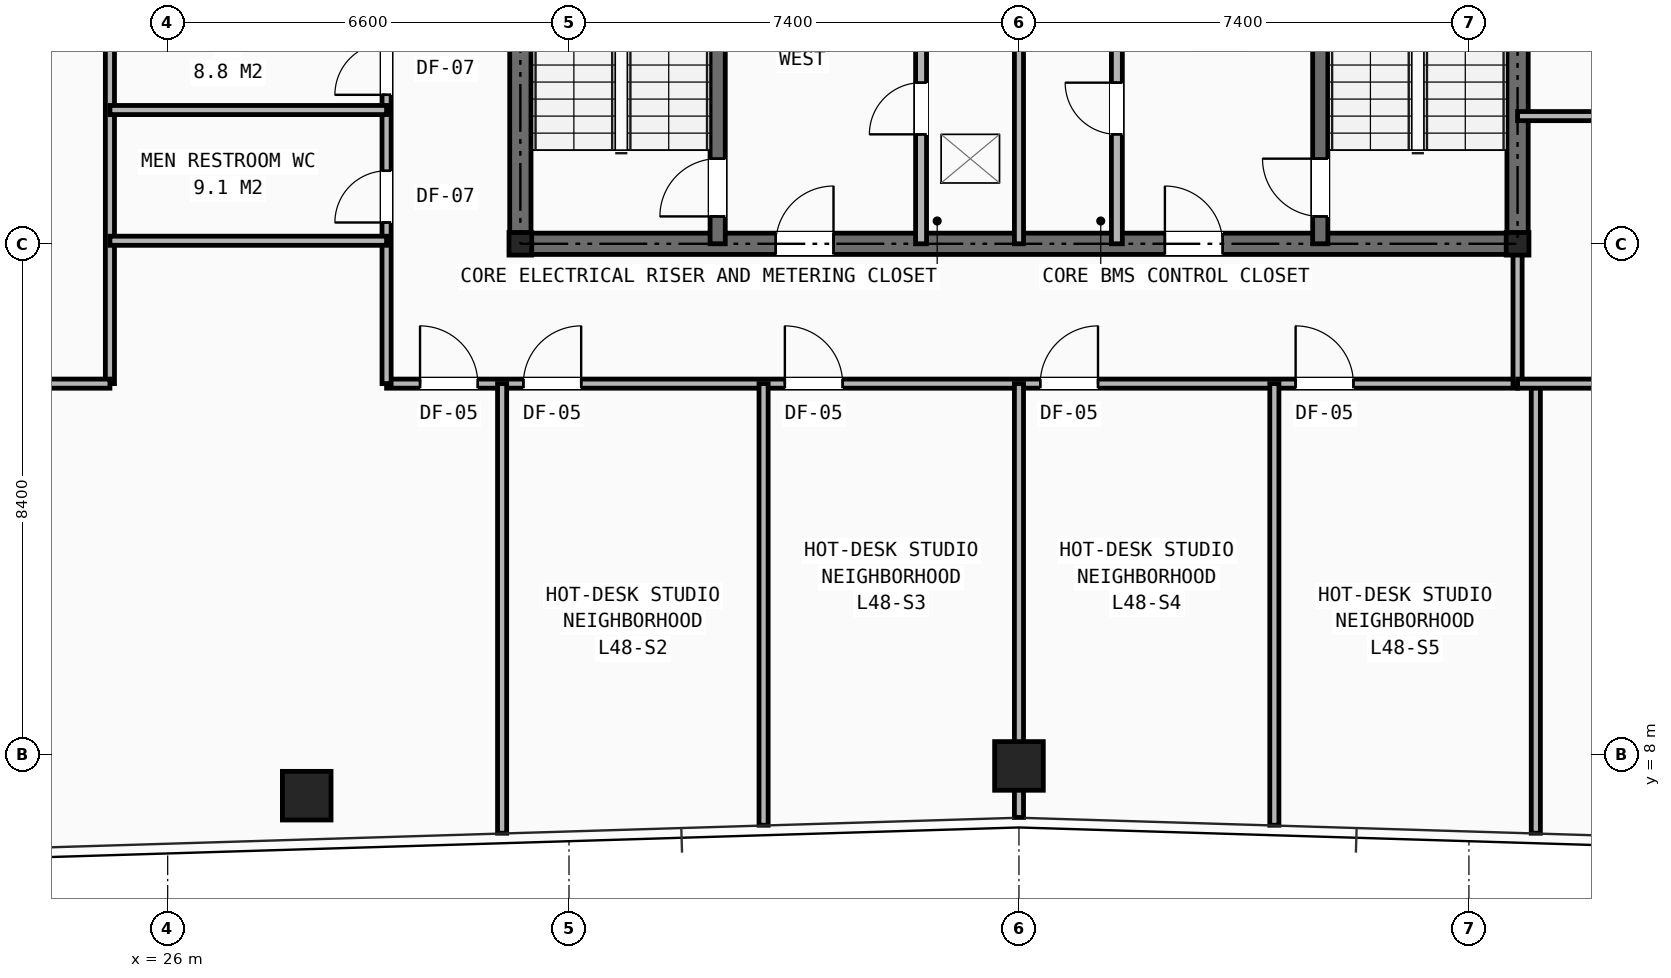
"""IFC4 building model, lengths in metres.
Left out: names, types, materials, properties, quantities, classifications, styles, units other than length and angle.
Written with IfcOpenShell. Run it as: python <this file> out.ifc"""

import sys

from ifc_helpers import new_model, si_unit, direction, frame, frame_2d, origin, origin_2d, place, context, subcontext, project, spatial, rectangle, hollow_rectangle, i_section, extrude, element, fill, save


model = new_model("IFC4")
c1 = context("Model", 3, precision=1e-05, world=origin(), true_north=direction((0.0, 1.0)))
c2 = subcontext(c1, "Body", "Model", "MODEL_VIEW")
j1 = project(units=[si_unit("LENGTHUNIT", "METRE"), si_unit("PLANEANGLEUNIT", "RADIAN")], contexts=[c1])
p1 = place(None, origin())
s1 = spatial("IfcSite", under=j1, at=p1, CompositionType="ELEMENT")
p2 = place(p1, origin())
s2 = spatial("IfcBuilding", under=s1, at=p2, CompositionType="ELEMENT")
p3 = place(p2, frame((0.0, 0.0, 168.9)))
s3 = spatial("IfcBuildingStorey", under=s2, at=p3, CompositionType="ELEMENT", Elevation=168.9)
for number, where, z_axis, x_axis in (
    (1, (31.8, 16.4, 0.0), (0.0, 0.0, 1.0), (1.0, 0.0, 0.0)),
    (2, (48.2, 16.4, 0.0), (0.0, 0.0, 1.0), (1.0, 0.0, 0.0)),
):
    element("IfcColumn", number, at=place(p3, frame(where, z_axis=z_axis, x_axis=x_axis)), inside=s3, PredefinedType="COLUMN", context=c2, shape_type="SweptSolid", body=[
        extrude(i_section(OverallWidth=0.374, OverallDepth=0.372, WebThickness=0.016, FlangeThickness=0.026, at=origin_2d()), origin(), (0.0, 0.0, 1.0), 3.45),
    ])
for number, where, z_axis, x_axis in (
    (3, (28.287, 7.323, 0.0), (0.0, 0.0, 1.0), (1.0, 0.0, 0.0)),
    (4, (40.0, 7.812, 0.0), (0.0, 0.0, 1.0), (1.0, 0.0, 0.0)),
):
    element("IfcColumn", number, at=place(p3, frame(where, z_axis=z_axis, x_axis=x_axis)), inside=s3, PredefinedType="COLUMN", context=c2, shape_type="SweptSolid", body=[
        extrude(hollow_rectangle(XDim=0.8, YDim=0.8, WallThickness=0.055, at=origin_2d()), origin(), (0.0, 0.0, 1.0), 3.45),
    ])
p4 = place(p3, frame((31.8, 16.4, 0.0), z_axis=(0.0, 0.0, 1.0), x_axis=(1.0, 0.0, 0.0)))
e5 = element("IfcWall", 5, at=p4, inside=s3, PredefinedType="SHEAR", context=c2, shape_type="SweptSolid", body=[
    extrude(rectangle(XDim=16.4, YDim=0.35, at=frame_2d((8.2, 0.0))), origin(), (0.0, 0.0, 1.0), 3.21),
])
p5 = place(p4, frame((4.2, 0.0, 0.0)))
e6 = element("IfcOpeningElement", 6, at=p5, cuts=e5, PredefinedType="OPENING", context=c2, shape_type="SweptSolid", body=[
    extrude(rectangle(XDim=0.95, YDim=2.1, at=frame_2d((0.475, 1.05))), frame((0.0, 0.185, 0.0), z_axis=(0.0, -1.0, 0.0), x_axis=(1.0, 0.0, 0.0)), (0.0, 0.0, 1.0), 0.37),
])
p6 = place(p4, frame((10.6, 0.0, 0.0)))
e7 = element("IfcOpeningElement", 7, at=p6, cuts=e5, PredefinedType="OPENING", context=c2, shape_type="SweptSolid", body=[
    extrude(rectangle(XDim=0.95, YDim=2.1, at=frame_2d((0.475, 1.05))), frame((0.0, 0.185, 0.0), z_axis=(0.0, -1.0, 0.0), x_axis=(1.0, 0.0, 0.0)), (0.0, 0.0, 1.0), 0.37),
])
p7 = place(p3, frame((31.8, 16.4, 0.0), z_axis=(0.0, 0.0, 1.0), x_axis=(0.0, 1.0, 0.0)))
e8 = element("IfcWall", 8, at=p7, inside=s3, PredefinedType="SHEAR", context=c2, shape_type="SweptSolid", body=[
    extrude(rectangle(XDim=14.8, YDim=0.35, at=frame_2d((7.4, 0.0))), origin(), (0.0, 0.0, 1.0), 3.21),
])
p8 = place(p7, frame((11.0, 0.0, 0.0)))
e9 = element("IfcOpeningElement", 9, at=p8, cuts=e8, PredefinedType="OPENING", context=c2, shape_type="SweptSolid", body=[
    extrude(rectangle(XDim=1.1, YDim=2.15, at=frame_2d((0.55, 1.075))), frame((0.0, 0.185, 0.0), z_axis=(0.0, -1.0, 0.0), x_axis=(1.0, 0.0, 0.0)), (0.0, 0.0, 1.0), 0.37),
])
p9 = place(p3, frame((48.2, 16.4, 0.0), z_axis=(0.0, 0.0, 1.0), x_axis=(0.0, 1.0, 0.0)))
e10 = element("IfcWall", 10, at=p9, inside=s3, PredefinedType="SHEAR", context=c2, shape_type="SweptSolid", body=[
    extrude(rectangle(XDim=14.8, YDim=0.35, at=frame_2d((7.4, 0.0))), origin(), (0.0, 0.0, 1.0), 3.21),
])
p10 = place(p9, frame((11.0, 0.0, 0.0)))
e11 = element("IfcOpeningElement", 11, at=p10, cuts=e10, PredefinedType="OPENING", context=c2, shape_type="SweptSolid", body=[
    extrude(rectangle(XDim=1.1, YDim=2.15, at=frame_2d((0.55, 1.075))), frame((0.0, 0.185, 0.0), z_axis=(0.0, -1.0, 0.0), x_axis=(1.0, 0.0, 0.0)), (0.0, 0.0, 1.0), 0.37),
])
p11 = place(p3, frame((35.045, 16.4, 0.0), z_axis=(0.0, 0.0, 1.0), x_axis=(0.0, 1.0, 0.0)))
e12 = element("IfcWall", 12, at=p11, inside=s3, PredefinedType="SHEAR", context=c2, shape_type="SweptSolid", body=[
    extrude(rectangle(XDim=8.4, YDim=0.25, at=frame_2d((4.2, 0.0))), origin(), (0.0, 0.0, 1.0), 3.21),
])
p12 = place(p11, frame((0.45, 0.0, 0.0)))
e13 = element("IfcOpeningElement", 13, at=p12, cuts=e12, PredefinedType="OPENING", context=c2, shape_type="SweptSolid", body=[
    extrude(rectangle(XDim=0.95, YDim=2.1, at=frame_2d((0.475, 1.05))), frame((0.0, 0.135, 0.0), z_axis=(0.0, -1.0, 0.0), x_axis=(1.0, 0.0, 0.0)), (0.0, 0.0, 1.0), 0.27),
])
p13 = place(p3, frame((44.955, 16.4, 0.0), z_axis=(0.0, 0.0, 1.0), x_axis=(0.0, 1.0, 0.0)))
e14 = element("IfcWall", 14, at=p13, inside=s3, PredefinedType="SHEAR", context=c2, shape_type="SweptSolid", body=[
    extrude(rectangle(XDim=8.4, YDim=0.25, at=frame_2d((4.2, 0.0))), origin(), (0.0, 0.0, 1.0), 3.21),
])
p14 = place(p13, frame((0.45, 0.0, 0.0)))
e15 = element("IfcOpeningElement", 15, at=p14, cuts=e14, PredefinedType="OPENING", context=c2, shape_type="SweptSolid", body=[
    extrude(rectangle(XDim=0.95, YDim=2.1, at=frame_2d((0.475, 1.05))), frame((0.0, 0.135, 0.0), z_axis=(0.0, -1.0, 0.0), x_axis=(1.0, 0.0, 0.0)), (0.0, 0.0, 1.0), 0.27),
])
p15 = place(p3, frame((38.39, 16.4, 0.0), z_axis=(0.0, 0.0, 1.0), x_axis=(0.0, 1.0, 0.0)))
e16 = element("IfcWall", 16, at=p15, inside=s3, PredefinedType="PARTITIONING", context=c2, shape_type="SweptSolid", body=[
    extrude(rectangle(XDim=8.4, YDim=0.18, at=frame_2d((4.2, 0.0))), origin(), (0.0, 0.0, 1.0), 2.665),
])
p16 = place(p15, frame((1.8, 0.0, 0.0)))
e17 = element("IfcOpeningElement", 17, at=p16, cuts=e16, PredefinedType="OPENING", context=c2, shape_type="SweptSolid", body=[
    extrude(rectangle(XDim=0.85, YDim=2.05, at=frame_2d((0.425, 1.025))), frame((0.0, 0.1, 0.0), z_axis=(0.0, -1.0, 0.0), x_axis=(1.0, 0.0, 0.0)), (0.0, 0.0, 1.0), 0.2),
])
p17 = place(p15, frame((4.35, 0.0, 0.0)))
e18 = element("IfcOpeningElement", 18, at=p17, cuts=e16, PredefinedType="OPENING", context=c2, shape_type="SweptSolid", body=[
    extrude(rectangle(XDim=0.95, YDim=2.1, at=frame_2d((0.475, 1.05))), frame((0.0, 0.1, 0.0), z_axis=(0.0, -1.0, 0.0), x_axis=(1.0, 0.0, 0.0)), (0.0, 0.0, 1.0), 0.2),
])
p18 = place(p3, frame((41.61, 16.4, 0.0), z_axis=(0.0, 0.0, 1.0), x_axis=(0.0, 1.0, 0.0)))
e19 = element("IfcWall", 19, at=p18, inside=s3, PredefinedType="PARTITIONING", context=c2, shape_type="SweptSolid", body=[
    extrude(rectangle(XDim=8.4, YDim=0.18, at=frame_2d((4.2, 0.0))), origin(), (0.0, 0.0, 1.0), 2.665),
])
p19 = place(p18, frame((1.8, 0.0, 0.0)))
e20 = element("IfcOpeningElement", 20, at=p19, cuts=e19, PredefinedType="OPENING", context=c2, shape_type="SweptSolid", body=[
    extrude(rectangle(XDim=0.85, YDim=2.05, at=frame_2d((0.425, 1.025))), frame((0.0, 0.1, 0.0), z_axis=(0.0, -1.0, 0.0), x_axis=(1.0, 0.0, 0.0)), (0.0, 0.0, 1.0), 0.2),
])
p20 = place(p3, frame((40.0, 16.4, 0.0), z_axis=(0.0, 0.0, 1.0), x_axis=(0.0, 1.0, 0.0)))
e21 = element("IfcWall", 21, at=p20, inside=s3, PredefinedType="PARTITIONING", context=c2, shape_type="SweptSolid", body=[
    extrude(rectangle(XDim=3.9, YDim=0.15, at=frame_2d((1.95, 0.0))), origin(), (0.0, 0.0, 1.0), 2.665),
])
p21 = place(p3, frame((29.6, 14.1, 0.0), z_axis=(0.0, 0.0, 1.0), x_axis=(1.0, 0.0, 0.0)))
e22 = element("IfcWall", 22, at=p21, inside=s3, PredefinedType="PARTITIONING", context=c2, shape_type="SweptSolid", body=[
    extrude(rectangle(XDim=18.6, YDim=0.15, at=frame_2d((9.3, 0.0))), origin(), (0.0, 0.0, 1.0), 2.225),
])
p22 = place(p21, frame((0.55, 0.0, 0.0)))
e23 = element("IfcOpeningElement", 23, at=p22, cuts=e22, PredefinedType="OPENING", context=c2, shape_type="SweptSolid", body=[
    extrude(rectangle(XDim=0.95, YDim=2.1, at=frame_2d((0.475, 1.05))), frame((0.0, 0.085, 0.0), z_axis=(0.0, -1.0, 0.0), x_axis=(1.0, 0.0, 0.0)), (0.0, 0.0, 1.0), 0.17),
])
p23 = place(p21, frame((2.25, 0.0, 0.0)))
e24 = element("IfcOpeningElement", 24, at=p23, cuts=e22, PredefinedType="OPENING", context=c2, shape_type="SweptSolid", body=[
    extrude(rectangle(XDim=0.95, YDim=2.1, at=frame_2d((0.475, 1.05))), frame((0.0, 0.085, 0.0), z_axis=(0.0, -1.0, 0.0), x_axis=(1.0, 0.0, 0.0)), (0.0, 0.0, 1.0), 0.17),
])
p24 = place(p21, frame((6.55, 0.0, 0.0)))
e25 = element("IfcOpeningElement", 25, at=p24, cuts=e22, PredefinedType="OPENING", context=c2, shape_type="SweptSolid", body=[
    extrude(rectangle(XDim=0.95, YDim=2.1, at=frame_2d((0.475, 1.05))), frame((0.0, 0.085, 0.0), z_axis=(0.0, -1.0, 0.0), x_axis=(1.0, 0.0, 0.0)), (0.0, 0.0, 1.0), 0.17),
])
p25 = place(p21, frame((10.75, 0.0, 0.0)))
e26 = element("IfcOpeningElement", 26, at=p25, cuts=e22, PredefinedType="OPENING", context=c2, shape_type="SweptSolid", body=[
    extrude(rectangle(XDim=0.95, YDim=2.1, at=frame_2d((0.475, 1.05))), frame((0.0, 0.085, 0.0), z_axis=(0.0, -1.0, 0.0), x_axis=(1.0, 0.0, 0.0)), (0.0, 0.0, 1.0), 0.17),
])
p26 = place(p21, frame((14.95, 0.0, 0.0)))
e27 = element("IfcOpeningElement", 27, at=p26, cuts=e22, PredefinedType="OPENING", context=c2, shape_type="SweptSolid", body=[
    extrude(rectangle(XDim=0.95, YDim=2.1, at=frame_2d((0.475, 1.05))), frame((0.0, 0.085, 0.0), z_axis=(0.0, -1.0, 0.0), x_axis=(1.0, 0.0, 0.0)), (0.0, 0.0, 1.0), 0.17),
])
p27 = place(p3, frame((48.2, 14.1, 0.0), z_axis=(0.0, 0.0, 1.0), x_axis=(0.0, 1.0, 0.0)))
e28 = element("IfcWall", 28, at=p27, inside=s3, PredefinedType="PARTITIONING", context=c2, shape_type="SweptSolid", body=[
    extrude(rectangle(XDim=2.3, YDim=0.15, at=frame_2d((1.15, 0.0))), origin(), (0.0, 0.0, 1.0), 2.665),
])
p28 = place(p3, frame((29.6, 14.1, 0.0), z_axis=(0.0, 0.0, 1.0), x_axis=(0.0, 1.0, 0.0)))
e29 = element("IfcWall", 29, at=p28, inside=s3, PredefinedType="PARTITIONING", context=c2, shape_type="SweptSolid", body=[
    extrude(rectangle(XDim=8.7, YDim=0.15, at=frame_2d((4.35, 0.0))), origin(), (0.0, 0.0, 1.0), 3.21),
])
p29 = place(p28, frame((2.65, 0.0, 0.0)))
e30 = element("IfcOpeningElement", 30, at=p29, cuts=e29, PredefinedType="OPENING", context=c2, shape_type="SweptSolid", body=[
    extrude(rectangle(XDim=0.85, YDim=2.05, at=frame_2d((0.425, 1.025))), frame((0.0, 0.085, 0.0), z_axis=(0.0, -1.0, 0.0), x_axis=(1.0, 0.0, 0.0)), (0.0, 0.0, 1.0), 0.17),
])
p30 = place(p28, frame((4.75, 0.0, 0.0)))
e31 = element("IfcOpeningElement", 31, at=p30, cuts=e29, PredefinedType="OPENING", context=c2, shape_type="SweptSolid", body=[
    extrude(rectangle(XDim=0.85, YDim=2.05, at=frame_2d((0.425, 1.025))), frame((0.0, 0.085, 0.0), z_axis=(0.0, -1.0, 0.0), x_axis=(1.0, 0.0, 0.0)), (0.0, 0.0, 1.0), 0.17),
])
p31 = place(p28, frame((6.85, 0.0, 0.0)))
e32 = element("IfcOpeningElement", 32, at=p31, cuts=e29, PredefinedType="OPENING", context=c2, shape_type="SweptSolid", body=[
    extrude(rectangle(XDim=0.85, YDim=2.05, at=frame_2d((0.425, 1.025))), frame((0.0, 0.085, 0.0), z_axis=(0.0, -1.0, 0.0), x_axis=(1.0, 0.0, 0.0)), (0.0, 0.0, 1.0), 0.17),
])
p32 = place(p3, frame((25.05, 14.1, 0.0), z_axis=(0.0, 0.0, 1.0), x_axis=(0.0, 1.0, 0.0)))
e33 = element("IfcWall", 33, at=p32, inside=s3, PredefinedType="PARTITIONING", context=c2, shape_type="SweptSolid", body=[
    extrude(rectangle(XDim=8.7, YDim=0.15, at=frame_2d((4.35, 0.0))), origin(), (0.0, 0.0, 1.0), 3.21),
])
for number, where, z_axis, x_axis in (
    (34, (25.05, 16.45, 0.0), (0.0, 0.0, 1.0), (1.0, 0.0, 0.0)),
    (35, (25.05, 18.6, 0.0), (0.0, 0.0, 1.0), (1.0, 0.0, 0.0)),
):
    element("IfcWall", number, at=place(p3, frame(where, z_axis=z_axis, x_axis=x_axis)), inside=s3, PredefinedType="PARTITIONING", context=c2, shape_type="SweptSolid", body=[
        extrude(rectangle(XDim=4.55, YDim=0.15, at=frame_2d((2.275, 0.0))), origin(), (0.0, 0.0, 1.0), 3.21),
    ])
p33 = place(p3, frame((31.5, 6.706, 0.0), z_axis=(0.0, 0.0, 1.0), x_axis=(0.0, 1.0, 0.0)))
e36 = element("IfcWall", 36, at=p33, inside=s3, PredefinedType="PARTITIONING", context=c2, shape_type="SweptSolid", body=[
    extrude(rectangle(XDim=7.394, YDim=0.15, at=frame_2d((3.697, 0.0))), origin(), (0.0, 0.0, 1.0), 2.589),
])
p34 = place(p3, frame((35.8, 6.837, 0.0), z_axis=(0.0, 0.0, 1.0), x_axis=(0.0, 1.0, 0.0)))
e37 = element("IfcWall", 37, at=p34, inside=s3, PredefinedType="PARTITIONING", context=c2, shape_type="SweptSolid", body=[
    extrude(rectangle(XDim=7.263, YDim=0.15, at=frame_2d((3.631, 0.0))), origin(), (0.0, 0.0, 1.0), 2.225),
])
p35 = place(p3, frame((40.0, 6.965, 0.0), z_axis=(0.0, 0.0, 1.0), x_axis=(0.0, 1.0, 0.0)))
e38 = element("IfcWall", 38, at=p35, inside=s3, PredefinedType="PARTITIONING", context=c2, shape_type="SweptSolid", body=[
    extrude(rectangle(XDim=7.135, YDim=0.15, at=frame_2d((3.567, 0.0))), origin(), (0.0, 0.0, 1.0), 2.225),
])
p36 = place(p3, frame((44.2, 6.837, 0.0), z_axis=(0.0, 0.0, 1.0), x_axis=(0.0, 1.0, 0.0)))
e39 = element("IfcWall", 39, at=p36, inside=s3, PredefinedType="PARTITIONING", context=c2, shape_type="SweptSolid", body=[
    extrude(rectangle(XDim=7.263, YDim=0.15, at=frame_2d((3.631, 0.0))), origin(), (0.0, 0.0, 1.0), 2.589),
])
p37 = place(p3, frame((48.5, 6.706, 0.0), z_axis=(0.0, 0.0, 1.0), x_axis=(0.0, 1.0, 0.0)))
e40 = element("IfcWall", 40, at=p37, inside=s3, PredefinedType="PARTITIONING", context=c2, shape_type="SweptSolid", body=[
    extrude(rectangle(XDim=7.394, YDim=0.15, at=frame_2d((3.697, 0.0))), origin(), (0.0, 0.0, 1.0), 2.589),
])
p38 = place(p3, frame((13.492, 14.1, 0.0), z_axis=(0.0, 0.0, 1.0), x_axis=(1.0, 0.0, 0.0)))
e41 = element("IfcWall", 41, at=p38, inside=s3, PredefinedType="PARTITIONING", context=c2, shape_type="SweptSolid", body=[
    extrude(rectangle(XDim=11.558, YDim=0.15, at=frame_2d((5.779, 0.0))), origin(), (0.0, 0.0, 1.0), 2.589),
])
p39 = place(p3, frame((48.2, 14.1, 0.0), z_axis=(0.0, 0.0, 1.0), x_axis=(1.0, 0.0, 0.0)))
e42 = element("IfcWall", 42, at=p39, inside=s3, PredefinedType="PARTITIONING", context=c2, shape_type="SweptSolid", body=[
    extrude(rectangle(XDim=18.308, YDim=0.15, at=frame_2d((9.154, 0.0))), origin(), (0.0, 0.0, 1.0), 2.589),
])
p40 = place(p3, frame((48.2, 18.5, 0.0), z_axis=(0.0, 0.0, 1.0), x_axis=(1.0, 0.0, 0.0)))
e43 = element("IfcWall", 43, at=p40, inside=s3, PredefinedType="PARTITIONING", context=c2, shape_type="SweptSolid", body=[
    extrude(rectangle(XDim=15.585, YDim=0.15, at=frame_2d((7.792, 0.0))), origin(), (0.0, 0.0, 1.0), 2.589),
])
p41 = place(p40, frame((1.4, 0.0, 0.0)))
e44 = element("IfcOpeningElement", 44, at=p41, cuts=e43, PredefinedType="OPENING", context=c2, shape_type="SweptSolid", body=[
    extrude(rectangle(XDim=0.95, YDim=2.1, at=frame_2d((0.475, 1.05))), frame((0.0, 0.085, 0.0), z_axis=(0.0, -1.0, 0.0), x_axis=(1.0, 0.0, 0.0)), (0.0, 0.0, 1.0), 0.17),
])
p42 = place(p16, origin())
e45 = element("IfcDoor", 45, at=p42, inside=s3, OperationType="SINGLE_SWING_LEFT", PredefinedType="DOOR", context=c2, shape_type="SweptSolid", body=[
    extrude(rectangle(XDim=0.85, YDim=2.05, at=frame_2d((0.425, 1.025))), frame((0.0, 0.025, 0.0), z_axis=(0.0, -1.0, 0.0), x_axis=(1.0, 0.0, 0.0)), (0.0, 0.0, 1.0), 0.05),
])
fill(e17, e45)
p43 = place(p19, origin())
e46 = element("IfcDoor", 46, at=p43, inside=s3, OperationType="SINGLE_SWING_RIGHT", PredefinedType="DOOR", context=c2, shape_type="SweptSolid", body=[
    extrude(rectangle(XDim=0.85, YDim=2.05, at=frame_2d((0.425, 1.025))), frame((0.0, 0.025, 0.0), z_axis=(0.0, -1.0, 0.0), x_axis=(1.0, 0.0, 0.0)), (0.0, 0.0, 1.0), 0.05),
])
fill(e20, e46)
p44 = place(p12, origin())
e47 = element("IfcDoor", 47, at=p44, inside=s3, OperationType="SINGLE_SWING_LEFT", PredefinedType="DOOR", context=c2, shape_type="SweptSolid", body=[
    extrude(rectangle(XDim=0.95, YDim=2.1, at=frame_2d((0.475, 1.05))), frame((0.0, 0.025, 0.0), z_axis=(0.0, -1.0, 0.0), x_axis=(1.0, 0.0, 0.0)), (0.0, 0.0, 1.0), 0.05),
])
fill(e13, e47)
p45 = place(p14, origin())
e48 = element("IfcDoor", 48, at=p45, inside=s3, OperationType="SINGLE_SWING_RIGHT", PredefinedType="DOOR", context=c2, shape_type="SweptSolid", body=[
    extrude(rectangle(XDim=0.95, YDim=2.1, at=frame_2d((0.475, 1.05))), frame((0.0, 0.025, 0.0), z_axis=(0.0, -1.0, 0.0), x_axis=(1.0, 0.0, 0.0)), (0.0, 0.0, 1.0), 0.05),
])
fill(e15, e48)
p46 = place(p5, origin())
e49 = element("IfcDoor", 49, at=p46, inside=s3, OperationType="SINGLE_SWING_RIGHT", PredefinedType="DOOR", context=c2, shape_type="SweptSolid", body=[
    extrude(rectangle(XDim=0.95, YDim=2.1, at=frame_2d((0.475, 1.05))), frame((0.0, 0.025, 0.0), z_axis=(0.0, -1.0, 0.0), x_axis=(1.0, 0.0, 0.0)), (0.0, 0.0, 1.0), 0.05),
])
fill(e6, e49)
p47 = place(p6, origin())
e50 = element("IfcDoor", 50, at=p47, inside=s3, OperationType="SINGLE_SWING_LEFT", PredefinedType="DOOR", context=c2, shape_type="SweptSolid", body=[
    extrude(rectangle(XDim=0.95, YDim=2.1, at=frame_2d((0.475, 1.05))), frame((0.0, 0.025, 0.0), z_axis=(0.0, -1.0, 0.0), x_axis=(1.0, 0.0, 0.0)), (0.0, 0.0, 1.0), 0.05),
])
fill(e7, e50)
p48 = place(p29, origin())
e51 = element("IfcDoor", 51, at=p48, inside=s3, OperationType="SINGLE_SWING_LEFT", PredefinedType="DOOR", context=c2, shape_type="SweptSolid", body=[
    extrude(rectangle(XDim=0.85, YDim=2.05, at=frame_2d((0.425, 1.025))), frame((0.0, 0.025, 0.0), z_axis=(0.0, -1.0, 0.0), x_axis=(1.0, 0.0, 0.0)), (0.0, 0.0, 1.0), 0.05),
])
fill(e30, e51)
p49 = place(p30, origin())
e52 = element("IfcDoor", 52, at=p49, inside=s3, OperationType="SINGLE_SWING_LEFT", PredefinedType="DOOR", context=c2, shape_type="SweptSolid", body=[
    extrude(rectangle(XDim=0.85, YDim=2.05, at=frame_2d((0.425, 1.025))), frame((0.0, 0.025, 0.0), z_axis=(0.0, -1.0, 0.0), x_axis=(1.0, 0.0, 0.0)), (0.0, 0.0, 1.0), 0.05),
])
fill(e31, e52)
p50 = place(p22, origin())
e53 = element("IfcDoor", 53, at=p50, inside=s3, OperationType="SINGLE_SWING_LEFT", PredefinedType="DOOR", context=c2, shape_type="SweptSolid", body=[
    extrude(rectangle(XDim=0.95, YDim=2.1, at=frame_2d((0.475, 1.05))), frame((0.0, 0.025, 0.0), z_axis=(0.0, -1.0, 0.0), x_axis=(1.0, 0.0, 0.0)), (0.0, 0.0, 1.0), 0.05),
])
fill(e23, e53)
p51 = place(p23, origin())
e54 = element("IfcDoor", 54, at=p51, inside=s3, OperationType="SINGLE_SWING_RIGHT", PredefinedType="DOOR", context=c2, shape_type="SweptSolid", body=[
    extrude(rectangle(XDim=0.95, YDim=2.1, at=frame_2d((0.475, 1.05))), frame((0.0, 0.025, 0.0), z_axis=(0.0, -1.0, 0.0), x_axis=(1.0, 0.0, 0.0)), (0.0, 0.0, 1.0), 0.05),
])
fill(e24, e54)
p52 = place(p24, origin())
e55 = element("IfcDoor", 55, at=p52, inside=s3, OperationType="SINGLE_SWING_LEFT", PredefinedType="DOOR", context=c2, shape_type="SweptSolid", body=[
    extrude(rectangle(XDim=0.95, YDim=2.1, at=frame_2d((0.475, 1.05))), frame((0.0, 0.025, 0.0), z_axis=(0.0, -1.0, 0.0), x_axis=(1.0, 0.0, 0.0)), (0.0, 0.0, 1.0), 0.05),
])
fill(e25, e55)
p53 = place(p25, origin())
e56 = element("IfcDoor", 56, at=p53, inside=s3, OperationType="SINGLE_SWING_RIGHT", PredefinedType="DOOR", context=c2, shape_type="SweptSolid", body=[
    extrude(rectangle(XDim=0.95, YDim=2.1, at=frame_2d((0.475, 1.05))), frame((0.0, 0.025, 0.0), z_axis=(0.0, -1.0, 0.0), x_axis=(1.0, 0.0, 0.0)), (0.0, 0.0, 1.0), 0.05),
])
fill(e26, e56)
p54 = place(p26, origin())
e57 = element("IfcDoor", 57, at=p54, inside=s3, OperationType="SINGLE_SWING_LEFT", PredefinedType="DOOR", context=c2, shape_type="SweptSolid", body=[
    extrude(rectangle(XDim=0.95, YDim=2.1, at=frame_2d((0.475, 1.05))), frame((0.0, 0.025, 0.0), z_axis=(0.0, -1.0, 0.0), x_axis=(1.0, 0.0, 0.0)), (0.0, 0.0, 1.0), 0.05),
])
fill(e27, e57)
save(model, sys.argv[1])
